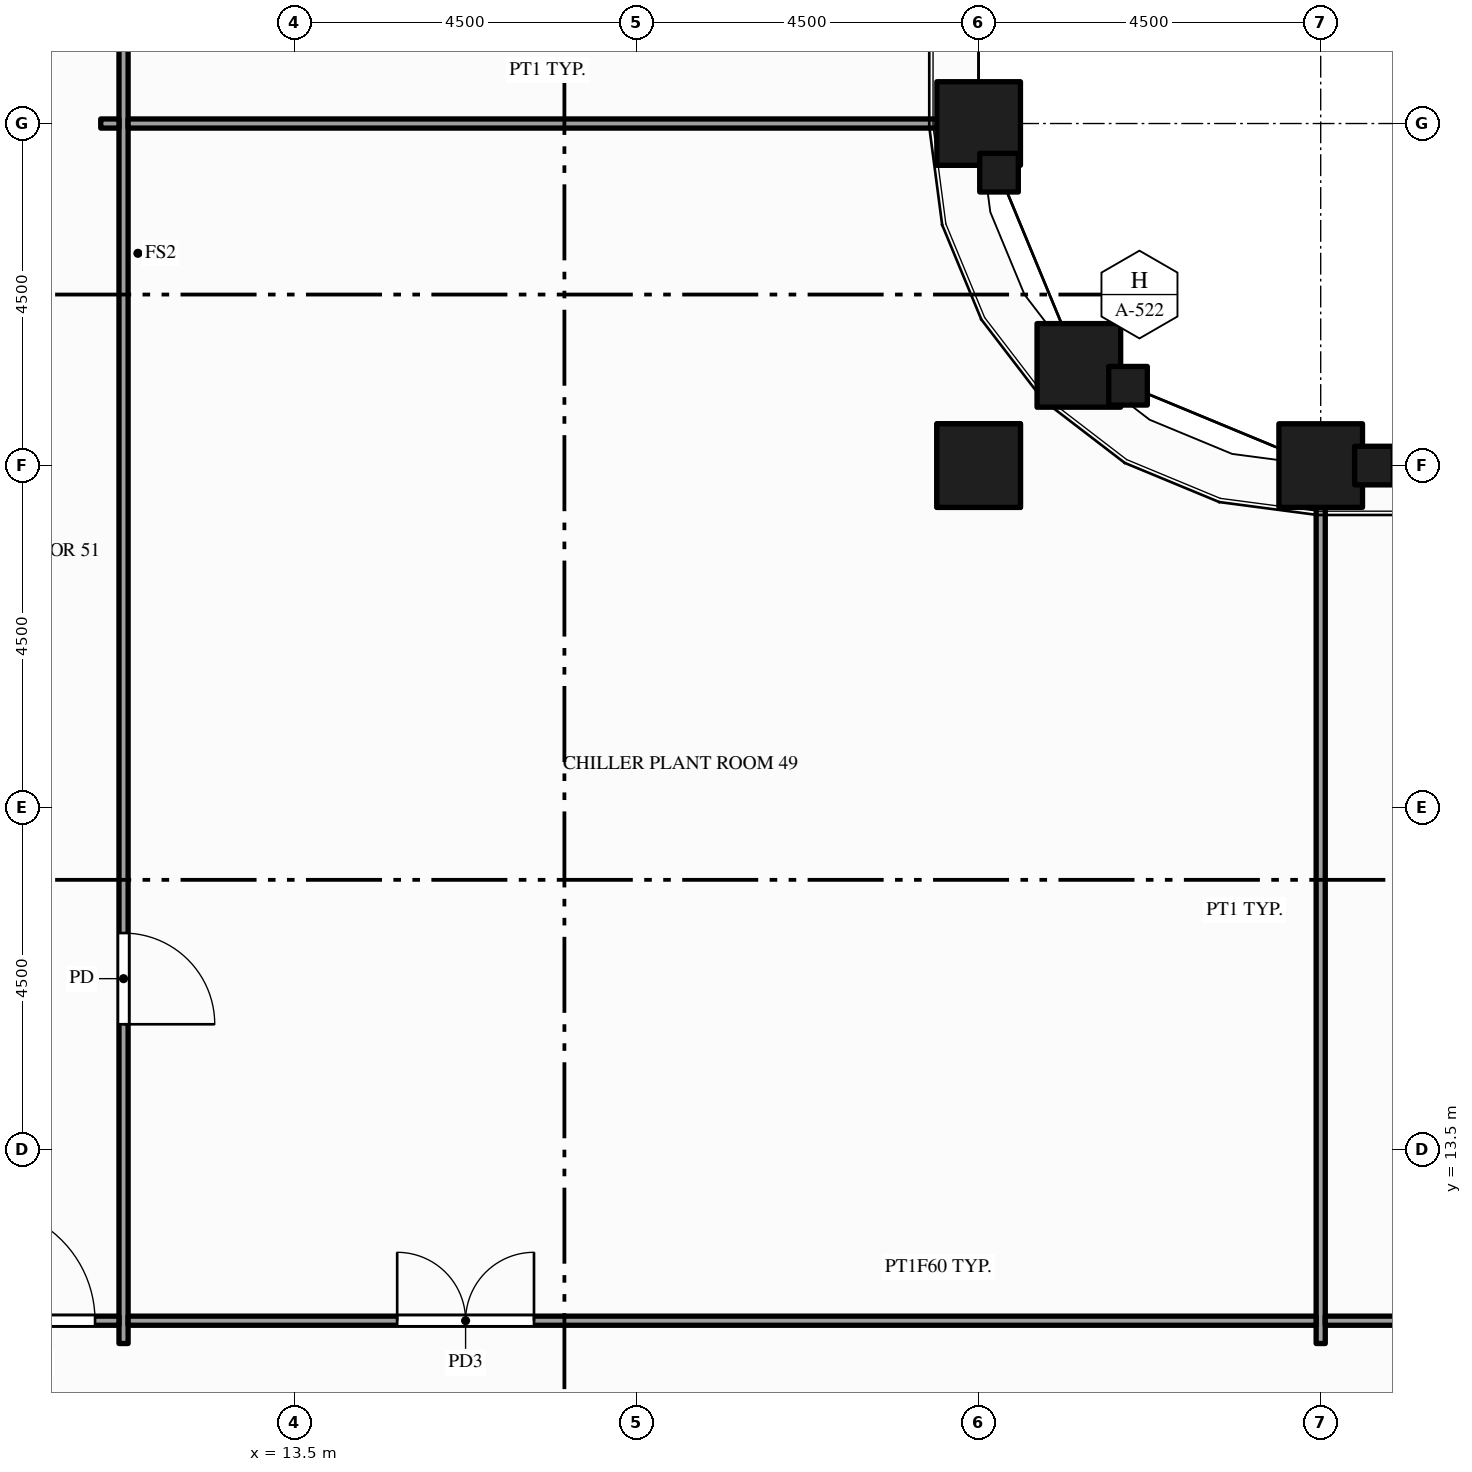
"""IFC4 building model, lengths in metres.
Left out: names, types, materials, properties, quantities, classifications, styles, units other than length and angle.
Written with IfcOpenShell. Run it as: python <this file> out.ifc"""

import sys

from ifc_helpers import new_model, si_unit, direction, frame, frame_2d, origin, origin_2d, place, context, subcontext, project, spatial, rectangle, hollow_rectangle, extrude, element, fill, save


model = new_model("IFC4")
c1 = context("Model", 3, precision=1e-05, world=origin(), true_north=direction((0.0, 1.0)))
c2 = subcontext(c1, "Body", "Model", "MODEL_VIEW")
j1 = project(units=[si_unit("LENGTHUNIT", "METRE"), si_unit("PLANEANGLEUNIT", "RADIAN")], contexts=[c1])
p1 = place(None, origin())
s1 = spatial("IfcSite", under=j1, at=p1, CompositionType="ELEMENT")
p2 = place(p1, origin())
s2 = spatial("IfcBuilding", under=s1, at=p2, CompositionType="ELEMENT")
p3 = place(p2, frame((0.0, 0.0, 77.0)))
s3 = spatial("IfcBuildingStorey", under=s2, at=p3, CompositionType="ELEMENT", Elevation=77.0)
p4 = place(p3, frame((22.5, 22.5, -0.25), z_axis=(0.0, 0.0, 1.0), x_axis=(1.0, 0.0, 0.0)))
e1 = element("IfcColumn", 1, at=p4, inside=s3, PredefinedType="COLUMN", context=c2, shape_type="SweptSolid", body=[
    extrude(hollow_rectangle(XDim=1.1, YDim=1.1, WallThickness=0.06, at=origin_2d()), origin(), (0.0, 0.0, 1.0), 4.6),
])
p5 = place(p3, frame((22.5, 22.5, 4.35), z_axis=(0.0, 0.0, 1.0), x_axis=(1.0, 0.0, 0.0)))
e2 = element("IfcColumn", 2, at=p5, inside=s3, PredefinedType="COLUMN", context=c2, shape_type="SweptSolid", body=[
    extrude(rectangle(XDim=1.1, YDim=1.1, at=origin_2d()), origin(), (0.0, 0.0, 1.0), 1.5),
])
for number, where, z_axis, x_axis in (
    (3, (22.5, 27.0, -0.25), (0.0, 0.0, 1.0), (1.0, 0.0, 0.0)),
    (4, (23.818, 23.818, -0.25), (0.0, 0.0, 1.0), (1.0, 0.0, 0.0)),
    (5, (27.0, 22.5, -0.25), (0.0, 0.0, 1.0), (1.0, 0.0, 0.0)),
):
    element("IfcColumn", number, at=place(p3, frame(where, z_axis=z_axis, x_axis=x_axis)), inside=s3, PredefinedType="COLUMN", context=c2, shape_type="SweptSolid", body=[
        extrude(hollow_rectangle(XDim=1.1, YDim=1.1, WallThickness=0.06, at=origin_2d()), origin(), (0.0, 0.0, 1.0), 6.1),
    ])
p6 = place(p3, frame((11.25, 10.95, 0.0), z_axis=(0.0, 0.0, 1.0), x_axis=(0.0, 1.0, 0.0)))
e6 = element("IfcWall", 6, at=p6, inside=s3, PredefinedType="PARTITIONING", context=c2, shape_type="SweptSolid", body=[
    extrude(rectangle(XDim=20.85, YDim=0.12, at=frame_2d((10.425, 0.0))), origin(), (0.0, 0.0, 1.0), 4.6),
])
p7 = place(p6, frame((17.8, 0.0, 0.0)))
e7 = element("IfcOpeningElement", 7, at=p7, cuts=e6, PredefinedType="OPENING", context=c2, shape_type="SweptSolid", body=[
    extrude(rectangle(XDim=1.0, YDim=2.1, at=frame_2d((0.5, 1.05))), frame((0.0, 0.07, 0.0), z_axis=(0.0, -1.0, 0.0), x_axis=(1.0, 0.0, 0.0)), (0.0, 0.0, 1.0), 0.14),
])
p8 = place(p6, frame((4.2, 0.0, 0.0)))
e8 = element("IfcOpeningElement", 8, at=p8, cuts=e6, PredefinedType="OPENING", context=c2, shape_type="SweptSolid", body=[
    extrude(rectangle(XDim=1.2, YDim=2.1, at=frame_2d((0.6, 1.05))), frame((0.0, 0.07, 0.0), z_axis=(0.0, -1.0, 0.0), x_axis=(1.0, 0.0, 0.0)), (0.0, 0.0, 1.0), 0.14),
])
p9 = place(p3, frame((27.0, 10.95, 0.0), z_axis=(0.0, 0.0, 1.0), x_axis=(0.0, 1.0, 0.0)))
e9 = element("IfcWall", 9, at=p9, inside=s3, PredefinedType="PARTITIONING", context=c2, shape_type="SweptSolid", body=[
    extrude(rectangle(XDim=11.4, YDim=0.12, at=frame_2d((5.7, 0.0))), origin(), (0.0, 0.0, 1.0), 4.938),
])
p10 = place(p3, frame((9.06, 11.25, 0.0), z_axis=(0.0, 0.0, 1.0), x_axis=(1.0, 0.0, 0.0)))
e10 = element("IfcWall", 10, at=p10, inside=s3, PredefinedType="PARTITIONING", context=c2, shape_type="SweptSolid", body=[
    extrude(rectangle(XDim=2.13, YDim=0.12, at=frame_2d((1.065, 0.0))), origin(), (0.0, 0.0, 1.0), 4.938),
])
p11 = place(p10, frame((0.315, 0.0, 0.0)))
e11 = element("IfcOpeningElement", 11, at=p11, cuts=e10, PredefinedType="OPENING", context=c2, shape_type="SweptSolid", body=[
    extrude(rectangle(XDim=1.5, YDim=2.1, at=frame_2d((0.75, 1.05))), frame((0.0, 0.07, 0.0), z_axis=(0.0, -1.0, 0.0), x_axis=(1.0, 0.0, 0.0)), (0.0, 0.0, 1.0), 0.14),
])
p12 = place(p3, frame((11.31, 11.25, 0.0), z_axis=(0.0, 0.0, 1.0), x_axis=(1.0, 0.0, 0.0)))
e12 = element("IfcWall", 12, at=p12, inside=s3, PredefinedType="PARTITIONING", context=c2, shape_type="SweptSolid", body=[
    extrude(rectangle(XDim=15.63, YDim=0.12, at=frame_2d((7.815, 0.0))), origin(), (0.0, 0.0, 1.0), 4.938),
])
p13 = place(p12, frame((3.54, 0.0, 0.0)))
e13 = element("IfcOpeningElement", 13, at=p13, cuts=e12, PredefinedType="OPENING", context=c2, shape_type="SweptSolid", body=[
    extrude(rectangle(XDim=1.8, YDim=2.1, at=frame_2d((0.9, 1.05))), frame((0.0, 0.07, 0.0), z_axis=(0.0, -1.0, 0.0), x_axis=(1.0, 0.0, 0.0)), (0.0, 0.0, 1.0), 0.14),
])
p14 = place(p3, frame((27.06, 11.25, 0.0), z_axis=(0.0, 0.0, 1.0), x_axis=(1.0, 0.0, 0.0)))
e14 = element("IfcWall", 14, at=p14, inside=s3, PredefinedType="PARTITIONING", context=c2, shape_type="SweptSolid", body=[
    extrude(rectangle(XDim=8.88, YDim=0.12, at=frame_2d((4.44, 0.0))), origin(), (0.0, 0.0, 1.0), 4.938),
])
p15 = place(p14, frame((3.84, 0.0, 0.0)))
e15 = element("IfcOpeningElement", 15, at=p15, cuts=e14, PredefinedType="OPENING", context=c2, shape_type="SweptSolid", body=[
    extrude(rectangle(XDim=1.2, YDim=2.1, at=frame_2d((0.6, 1.05))), frame((0.0, 0.07, 0.0), z_axis=(0.0, -1.0, 0.0), x_axis=(1.0, 0.0, 0.0)), (0.0, 0.0, 1.0), 0.14),
])
p16 = place(p3, frame((10.95, 27.0, 0.0), z_axis=(0.0, 0.0, 1.0), x_axis=(1.0, 0.0, 0.0)))
e16 = element("IfcWall", 16, at=p16, inside=s3, PredefinedType="PARTITIONING", context=c2, shape_type="SweptSolid", body=[
    extrude(rectangle(XDim=0.24, YDim=0.12, at=frame_2d((0.12, 0.0))), origin(), (0.0, 0.0, 1.0), 4.938),
])
p17 = place(p3, frame((11.31, 27.0, 0.0), z_axis=(0.0, 0.0, 1.0), x_axis=(1.0, 0.0, 0.0)))
e17 = element("IfcWall", 17, at=p17, inside=s3, PredefinedType="PARTITIONING", context=c2, shape_type="SweptSolid", body=[
    extrude(rectangle(XDim=11.04, YDim=0.12, at=frame_2d((5.52, 0.0))), origin(), (0.0, 0.0, 1.0), 4.938),
])
p18 = place(p13, origin())
e18 = element("IfcDoor", 18, at=p18, inside=s3, OperationType="DOUBLE_DOOR_SINGLE_SWING", PredefinedType="DOOR", context=c2, shape_type="SweptSolid", body=[
    extrude(rectangle(XDim=1.8, YDim=2.1, at=frame_2d((0.9, 1.05))), frame((0.0, 0.025, 0.0), z_axis=(0.0, -1.0, 0.0), x_axis=(1.0, 0.0, 0.0)), (0.0, 0.0, 1.0), 0.05),
])
fill(e13, e18)
p19 = place(p11, origin())
e19 = element("IfcDoor", 19, at=p19, inside=s3, OperationType="SINGLE_SWING_LEFT", PredefinedType="DOOR", context=c2, shape_type="SweptSolid", body=[
    extrude(rectangle(XDim=1.5, YDim=2.1, at=frame_2d((0.75, 1.05))), frame((0.0, 0.025, 0.0), z_axis=(0.0, -1.0, 0.0), x_axis=(1.0, 0.0, 0.0)), (0.0, 0.0, 1.0), 0.05),
])
fill(e11, e19)
p20 = place(p8, origin())
e20 = element("IfcDoor", 20, at=p20, inside=s3, OperationType="SINGLE_SWING_LEFT", PredefinedType="DOOR", context=c2, shape_type="SweptSolid", body=[
    extrude(rectangle(XDim=1.2, YDim=2.1, at=frame_2d((0.6, 1.05))), frame((0.0, 0.025, 0.0), z_axis=(0.0, -1.0, 0.0), x_axis=(1.0, 0.0, 0.0)), (0.0, 0.0, 1.0), 0.05),
])
fill(e8, e20)
save(model, sys.argv[1])
